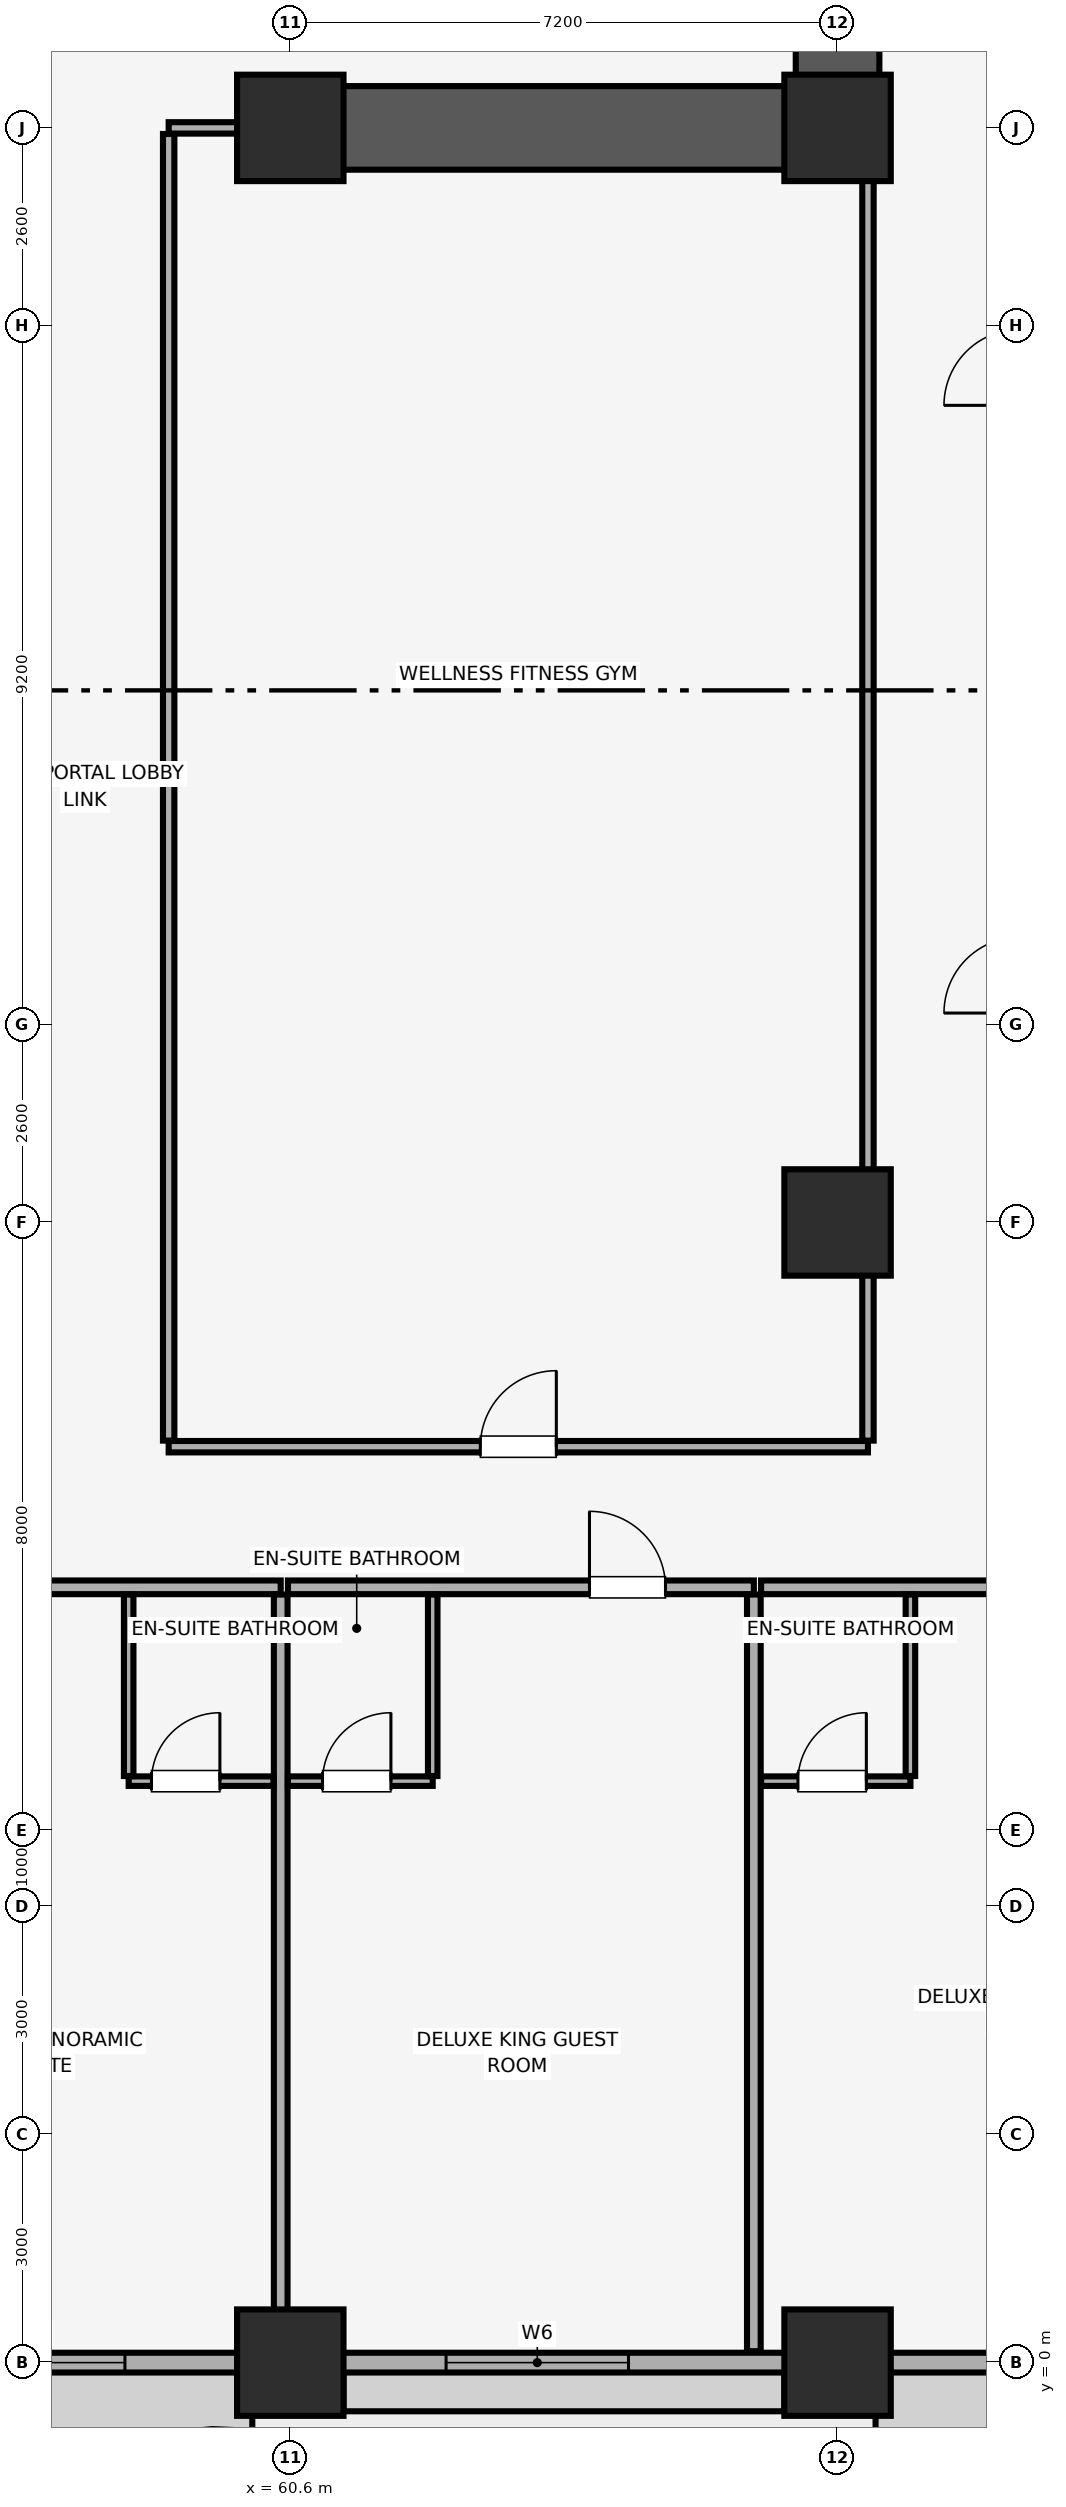
"""IFC4 building model, lengths in metres.
Left out: names, types, materials, properties, quantities, classifications, styles, units other than length and angle.
Written with IfcOpenShell. Run it as: python <this file> out.ifc"""

import sys

from ifc_helpers import new_model, si_unit, direction, frame, frame_2d, origin, origin_2d, place, context, subcontext, project, spatial, rectangle, extrude, element, fill, save


model = new_model("IFC4")
c1 = context("Model", 3, precision=1e-05, world=origin(), true_north=direction((0.0, 1.0)))
c2 = subcontext(c1, "Body", "Model", "MODEL_VIEW")
j1 = project(units=[si_unit("LENGTHUNIT", "METRE"), si_unit("PLANEANGLEUNIT", "RADIAN")], contexts=[c1])
p1 = place(None, origin())
s1 = spatial("IfcSite", under=j1, at=p1, CompositionType="ELEMENT")
p2 = place(p1, origin())
s2 = spatial("IfcBuilding", under=s1, at=p2, CompositionType="ELEMENT")
p3 = place(p2, frame((0.0, 0.0, 46.4)))
s3 = spatial("IfcBuildingStorey", under=s2, at=p3, CompositionType="ELEMENT", Elevation=46.4)
for number, where, z_axis, x_axis in (
    (1, (60.6, 0.0, 0.0), (0.0, 0.0, 1.0), (1.0, 0.0, 0.0)),
    (2, (67.8, 0.0, 0.0), (0.0, 0.0, 1.0), (1.0, 0.0, 0.0)),
    (3, (67.8, 15.0, 0.0), (0.0, 0.0, 1.0), (1.0, 0.0, 0.0)),
    (4, (60.6, 29.4, 0.0), (0.0, 0.0, 1.0), (1.0, 0.0, 0.0)),
    (5, (67.8, 29.4, 0.0), (0.0, 0.0, 1.0), (1.0, 0.0, 0.0)),
):
    element("IfcColumn", number, at=place(p3, frame(where, z_axis=z_axis, x_axis=x_axis)), inside=s3, PredefinedType="COLUMN", context=c2, shape_type="SweptSolid", body=[
        extrude(rectangle(XDim=1.4, YDim=1.4, at=origin_2d()), origin(), (0.0, 0.0, 1.0), 3.51),
    ])
p4 = place(p3, frame((4.2, 0.0, 0.0), z_axis=(0.0, 0.0, 1.0), x_axis=(1.0, 0.0, 0.0)))
e6 = element("IfcWall", 6, at=p4, inside=s3, PredefinedType="SOLIDWALL", context=c2, shape_type="SweptSolid", body=[
    extrude(rectangle(XDim=75.6, YDim=0.26, at=frame_2d((37.8, 0.0))), origin(), (0.0, 0.0, 1.0), 2.56),
])
p5 = place(p4, frame((22.948, 0.0, 0.0)))
e7 = element("IfcOpeningElement", 7, at=p5, cuts=e6, PredefinedType="OPENING", context=c2, shape_type="SweptSolid", body=[
    extrude(rectangle(XDim=1.1, YDim=2.15, at=frame_2d((0.55, 1.075))), frame((0.0, 0.14, 0.0), z_axis=(0.0, -1.0, 0.0), x_axis=(1.0, 0.0, 0.0)), (0.0, 0.0, 1.0), 0.28),
])
p6 = place(p4, frame((44.61, 0.0, 0.0)))
e8 = element("IfcOpeningElement", 8, at=p6, cuts=e6, PredefinedType="OPENING", context=c2, shape_type="SweptSolid", body=[
    extrude(rectangle(XDim=1.1, YDim=2.15, at=frame_2d((0.55, 1.075))), frame((0.0, 0.14, 0.0), z_axis=(0.0, -1.0, 0.0), x_axis=(1.0, 0.0, 0.0)), (0.0, 0.0, 1.0), 0.28),
])
p7 = place(p4, frame((66.272, 0.0, 0.0)))
e9 = element("IfcOpeningElement", 9, at=p7, cuts=e6, PredefinedType="OPENING", context=c2, shape_type="SweptSolid", body=[
    extrude(rectangle(XDim=1.1, YDim=2.15, at=frame_2d((0.55, 1.075))), frame((0.0, 0.14, 0.0), z_axis=(0.0, -1.0, 0.0), x_axis=(1.0, 0.0, 0.0)), (0.0, 0.0, 1.0), 0.28),
])
p8 = place(p4, frame((1.035, 0.0, 0.85)))
e10 = element("IfcOpeningElement", 10, at=p8, cuts=e6, PredefinedType="OPENING", context=c2, shape_type="SweptSolid", body=[
    extrude(rectangle(XDim=2.4, YDim=1.5, at=frame_2d((1.2, 0.75))), frame((0.0, 0.14, 0.0), z_axis=(0.0, -1.0, 0.0), x_axis=(1.0, 0.0, 0.0)), (0.0, 0.0, 1.0), 0.28),
])
p9 = place(p4, frame((7.837, 0.0, 0.85)))
e11 = element("IfcOpeningElement", 11, at=p9, cuts=e6, PredefinedType="OPENING", context=c2, shape_type="SweptSolid", body=[
    extrude(rectangle(XDim=2.4, YDim=1.5, at=frame_2d((1.2, 0.75))), frame((0.0, 0.14, 0.0), z_axis=(0.0, -1.0, 0.0), x_axis=(1.0, 0.0, 0.0)), (0.0, 0.0, 1.0), 0.28),
])
p10 = place(p4, frame((14.55, 0.0, 0.85)))
e12 = element("IfcOpeningElement", 12, at=p10, cuts=e6, PredefinedType="OPENING", context=c2, shape_type="SweptSolid", body=[
    extrude(rectangle(XDim=2.4, YDim=1.5, at=frame_2d((1.2, 0.75))), frame((0.0, 0.14, 0.0), z_axis=(0.0, -1.0, 0.0), x_axis=(1.0, 0.0, 0.0)), (0.0, 0.0, 1.0), 0.28),
])
p11 = place(p4, frame((20.439, 0.0, 0.85)))
e13 = element("IfcOpeningElement", 13, at=p11, cuts=e6, PredefinedType="OPENING", context=c2, shape_type="SweptSolid", body=[
    extrude(rectangle(XDim=1.5, YDim=1.4, at=frame_2d((0.75, 0.7))), frame((0.0, 0.14, 0.0), z_axis=(0.0, -1.0, 0.0), x_axis=(1.0, 0.0, 0.0)), (0.0, 0.0, 1.0), 0.28),
])
p12 = place(p4, frame((27.887, 0.0, 0.85)))
e14 = element("IfcOpeningElement", 14, at=p12, cuts=e6, PredefinedType="OPENING", context=c2, shape_type="SweptSolid", body=[
    extrude(rectangle(XDim=2.4, YDim=1.5, at=frame_2d((1.2, 0.75))), frame((0.0, 0.14, 0.0), z_axis=(0.0, -1.0, 0.0), x_axis=(1.0, 0.0, 0.0)), (0.0, 0.0, 1.0), 0.28),
])
p13 = place(p4, frame((34.6, 0.0, 0.85)))
e15 = element("IfcOpeningElement", 15, at=p13, cuts=e6, PredefinedType="OPENING", context=c2, shape_type="SweptSolid", body=[
    extrude(rectangle(XDim=2.4, YDim=1.5, at=frame_2d((1.2, 0.75))), frame((0.0, 0.14, 0.0), z_axis=(0.0, -1.0, 0.0), x_axis=(1.0, 0.0, 0.0)), (0.0, 0.0, 1.0), 0.28),
])
p14 = place(p4, frame((38.399, 0.0, 0.85)))
e16 = element("IfcOpeningElement", 16, at=p14, cuts=e6, PredefinedType="OPENING", context=c2, shape_type="SweptSolid", body=[
    extrude(rectangle(XDim=2.4, YDim=1.5, at=frame_2d((1.2, 0.75))), frame((0.0, 0.14, 0.0), z_axis=(0.0, -1.0, 0.0), x_axis=(1.0, 0.0, 0.0)), (0.0, 0.0, 1.0), 0.28),
])
p15 = place(p4, frame((46.59, 0.0, 0.85)))
e17 = element("IfcOpeningElement", 17, at=p15, cuts=e6, PredefinedType="OPENING", context=c2, shape_type="SweptSolid", body=[
    extrude(rectangle(XDim=1.5, YDim=1.4, at=frame_2d((0.75, 0.7))), frame((0.0, 0.14, 0.0), z_axis=(0.0, -1.0, 0.0), x_axis=(1.0, 0.0, 0.0)), (0.0, 0.0, 1.0), 0.28),
])
p16 = place(p4, frame((51.824, 0.0, 0.85)))
e18 = element("IfcOpeningElement", 18, at=p16, cuts=e6, PredefinedType="OPENING", context=c2, shape_type="SweptSolid", body=[
    extrude(rectangle(XDim=2.4, YDim=1.5, at=frame_2d((1.2, 0.75))), frame((0.0, 0.14, 0.0), z_axis=(0.0, -1.0, 0.0), x_axis=(1.0, 0.0, 0.0)), (0.0, 0.0, 1.0), 0.28),
])
p17 = place(p4, frame((58.449, 0.0, 0.85)))
e19 = element("IfcOpeningElement", 19, at=p17, cuts=e6, PredefinedType="OPENING", context=c2, shape_type="SweptSolid", body=[
    extrude(rectangle(XDim=2.4, YDim=1.5, at=frame_2d((1.2, 0.75))), frame((0.0, 0.14, 0.0), z_axis=(0.0, -1.0, 0.0), x_axis=(1.0, 0.0, 0.0)), (0.0, 0.0, 1.0), 0.28),
])
p18 = place(p4, frame((72.165, 0.0, 0.85)))
e20 = element("IfcOpeningElement", 20, at=p18, cuts=e6, PredefinedType="OPENING", context=c2, shape_type="SweptSolid", body=[
    extrude(rectangle(XDim=2.4, YDim=1.5, at=frame_2d((1.2, 0.75))), frame((0.0, 0.14, 0.0), z_axis=(0.0, -1.0, 0.0), x_axis=(1.0, 0.0, 0.0)), (0.0, 0.0, 1.0), 0.28),
])
p19 = place(p3, frame((67.8, 29.4, 0.0), z_axis=(0.0, 0.0, 1.0), x_axis=(0.0, 1.0, 0.0)))
e21 = element("IfcWall", 21, at=p19, inside=s3, PredefinedType="SHEAR", context=c2, shape_type="SweptSolid", body=[
    extrude(rectangle(XDim=19.2, YDim=1.1, at=frame_2d((9.6, 0.0))), origin(), (0.0, 0.0, 1.0), 3.51),
])
p20 = place(p3, frame((60.4, 29.4, 0.0), z_axis=(0.0, 0.0, 1.0), x_axis=(1.0, 0.0, 0.0)))
e22 = element("IfcWall", 22, at=p20, inside=s3, PredefinedType="SHEAR", context=c2, shape_type="SweptSolid", body=[
    extrude(rectangle(XDim=6.845, YDim=1.1, at=frame_2d((3.423, 0.0))), origin(), (0.0, 0.0, 1.0), 3.51),
])
p21 = place(p3, frame((54.344, 10.2, 0.0), z_axis=(0.0, 0.0, 1.0), x_axis=(1.0, 0.0, 0.0)))
e23 = element("IfcWall", 23, at=p21, inside=s3, PredefinedType="PARTITIONING", context=c2, shape_type="SweptSolid", body=[
    extrude(rectangle(XDim=6.13, YDim=0.18, at=frame_2d((3.065, 0.0))), origin(), (0.0, 0.0, 1.0), 3.51),
])
p22 = place(p21, frame((1.067, 0.0, 0.0)))
e24 = element("IfcOpeningElement", 24, at=p22, cuts=e23, PredefinedType="OPENING", context=c2, shape_type="SweptSolid", body=[
    extrude(rectangle(XDim=1.0, YDim=2.15, at=frame_2d((0.5, 1.075))), frame((0.0, 0.1, 0.0), z_axis=(0.0, -1.0, 0.0), x_axis=(1.0, 0.0, 0.0)), (0.0, 0.0, 1.0), 0.2),
])
p23 = place(p3, frame((60.474, 0.15, 0.0), z_axis=(0.0, 0.0, 1.0), x_axis=(0.0, 1.0, 0.0)))
e25 = element("IfcWall", 25, at=p23, inside=s3, PredefinedType="PARTITIONING", context=c2, shape_type="SweptSolid", body=[
    extrude(rectangle(XDim=9.955, YDim=0.18, at=frame_2d((4.978, 0.0))), origin(), (0.0, 0.0, 1.0), 2.898),
])
p24 = place(p3, frame((58.474, 7.65, 0.0), z_axis=(0.0, 0.0, 1.0), x_axis=(1.0, 0.0, 0.0)))
e26 = element("IfcWall", 26, at=p24, inside=s3, PredefinedType="PARTITIONING", context=c2, shape_type="SweptSolid", body=[
    extrude(rectangle(XDim=1.905, YDim=0.125, at=frame_2d((0.953, 0.0))), origin(), (0.0, 0.0, 1.0), 3.51),
])
p25 = place(p24, frame((0.3, 0.0, 0.0)))
e27 = element("IfcOpeningElement", 27, at=p25, cuts=e26, PredefinedType="OPENING", context=c2, shape_type="SweptSolid", body=[
    extrude(rectangle(XDim=0.9, YDim=2.1, at=frame_2d((0.45, 1.05))), frame((0.0, 0.073, 0.0), z_axis=(0.0, -1.0, 0.0), x_axis=(1.0, 0.0, 0.0)), (0.0, 0.0, 1.0), 0.145),
])
p26 = place(p3, frame((58.474, 7.718, 0.0), z_axis=(0.0, 0.0, 1.0), x_axis=(0.0, 1.0, 0.0)))
e28 = element("IfcWall", 28, at=p26, inside=s3, PredefinedType="PARTITIONING", context=c2, shape_type="SweptSolid", body=[
    extrude(rectangle(XDim=2.387, YDim=0.125, at=frame_2d((1.194, 0.0))), origin(), (0.0, 0.0, 1.0), 3.51),
])
p27 = place(p3, frame((60.569, 10.2, 0.0), z_axis=(0.0, 0.0, 1.0), x_axis=(1.0, 0.0, 0.0)))
e29 = element("IfcWall", 29, at=p27, inside=s3, PredefinedType="PARTITIONING", context=c2, shape_type="SweptSolid", body=[
    extrude(rectangle(XDim=6.13, YDim=0.18, at=frame_2d((3.065, 0.0))), origin(), (0.0, 0.0, 1.0), 3.51),
])
p28 = place(p27, frame((3.967, 0.0, 0.0)))
e30 = element("IfcOpeningElement", 30, at=p28, cuts=e29, PredefinedType="OPENING", context=c2, shape_type="SweptSolid", body=[
    extrude(rectangle(XDim=1.0, YDim=2.15, at=frame_2d((0.5, 1.075))), frame((0.0, 0.1, 0.0), z_axis=(0.0, -1.0, 0.0), x_axis=(1.0, 0.0, 0.0)), (0.0, 0.0, 1.0), 0.2),
])
p29 = place(p3, frame((66.699, 0.15, 0.0), z_axis=(0.0, 0.0, 1.0), x_axis=(0.0, 1.0, 0.0)))
e31 = element("IfcWall", 31, at=p29, inside=s3, PredefinedType="PARTITIONING", context=c2, shape_type="SweptSolid", body=[
    extrude(rectangle(XDim=9.955, YDim=0.18, at=frame_2d((4.978, 0.0))), origin(), (0.0, 0.0, 1.0), 3.51),
])
p30 = place(p3, frame((60.569, 7.65, 0.0), z_axis=(0.0, 0.0, 1.0), x_axis=(1.0, 0.0, 0.0)))
e32 = element("IfcWall", 32, at=p30, inside=s3, PredefinedType="PARTITIONING", context=c2, shape_type="SweptSolid", body=[
    extrude(rectangle(XDim=1.905, YDim=0.125, at=frame_2d((0.953, 0.0))), origin(), (0.0, 0.0, 1.0), 3.51),
])
p31 = place(p30, frame((0.455, 0.0, 0.0)))
e33 = element("IfcOpeningElement", 33, at=p31, cuts=e32, PredefinedType="OPENING", context=c2, shape_type="SweptSolid", body=[
    extrude(rectangle(XDim=0.9, YDim=2.1, at=frame_2d((0.45, 1.05))), frame((0.0, 0.073, 0.0), z_axis=(0.0, -1.0, 0.0), x_axis=(1.0, 0.0, 0.0)), (0.0, 0.0, 1.0), 0.145),
])
p32 = place(p3, frame((62.474, 7.718, 0.0), z_axis=(0.0, 0.0, 1.0), x_axis=(0.0, 1.0, 0.0)))
e34 = element("IfcWall", 34, at=p32, inside=s3, PredefinedType="PARTITIONING", context=c2, shape_type="SweptSolid", body=[
    extrude(rectangle(XDim=2.387, YDim=0.125, at=frame_2d((1.194, 0.0))), origin(), (0.0, 0.0, 1.0), 3.51),
])
p33 = place(p3, frame((66.794, 10.2, 0.0), z_axis=(0.0, 0.0, 1.0), x_axis=(1.0, 0.0, 0.0)))
e35 = element("IfcWall", 35, at=p33, inside=s3, PredefinedType="PARTITIONING", context=c2, shape_type="SweptSolid", body=[
    extrude(rectangle(XDim=6.331, YDim=0.18, at=frame_2d((3.165, 0.0))), origin(), (0.0, 0.0, 1.0), 3.51),
])
p34 = place(p33, frame((4.098, 0.0, 0.0)))
e36 = element("IfcOpeningElement", 36, at=p34, cuts=e35, PredefinedType="OPENING", context=c2, shape_type="SweptSolid", body=[
    extrude(rectangle(XDim=1.0, YDim=2.15, at=frame_2d((0.5, 1.075))), frame((0.0, 0.1, 0.0), z_axis=(0.0, -1.0, 0.0), x_axis=(1.0, 0.0, 0.0)), (0.0, 0.0, 1.0), 0.2),
])
p35 = place(p3, frame((66.794, 7.65, 0.0), z_axis=(0.0, 0.0, 1.0), x_axis=(1.0, 0.0, 0.0)))
e37 = element("IfcWall", 37, at=p35, inside=s3, PredefinedType="PARTITIONING", context=c2, shape_type="SweptSolid", body=[
    extrude(rectangle(XDim=1.965, YDim=0.125, at=frame_2d((0.982, 0.0))), origin(), (0.0, 0.0, 1.0), 3.51),
])
p36 = place(p35, frame((0.485, 0.0, 0.0)))
e38 = element("IfcOpeningElement", 38, at=p36, cuts=e37, PredefinedType="OPENING", context=c2, shape_type="SweptSolid", body=[
    extrude(rectangle(XDim=0.9, YDim=2.1, at=frame_2d((0.45, 1.05))), frame((0.0, 0.073, 0.0), z_axis=(0.0, -1.0, 0.0), x_axis=(1.0, 0.0, 0.0)), (0.0, 0.0, 1.0), 0.145),
])
p37 = place(p3, frame((68.759, 7.718, 0.0), z_axis=(0.0, 0.0, 1.0), x_axis=(0.0, 1.0, 0.0)))
e39 = element("IfcWall", 39, at=p37, inside=s3, PredefinedType="PARTITIONING", context=c2, shape_type="SweptSolid", body=[
    extrude(rectangle(XDim=2.387, YDim=0.125, at=frame_2d((1.194, 0.0))), origin(), (0.0, 0.0, 1.0), 3.51),
])
p38 = place(p3, frame((59.0, 12.05, 0.0), z_axis=(0.0, 0.0, 1.0), x_axis=(1.0, 0.0, 0.0)))
e40 = element("IfcWall", 40, at=p38, inside=s3, PredefinedType="PARTITIONING", context=c2, shape_type="SweptSolid", body=[
    extrude(rectangle(XDim=9.2, YDim=0.15, at=frame_2d((4.6, 0.0))), origin(), (0.0, 0.0, 1.0), 3.51),
])
p39 = place(p38, frame((4.1, 0.0, 0.0)))
e41 = element("IfcOpeningElement", 41, at=p39, cuts=e40, PredefinedType="OPENING", context=c2, shape_type="SweptSolid", body=[
    extrude(rectangle(XDim=1.0, YDim=2.15, at=frame_2d((0.5, 1.075))), frame((0.0, 0.085, 0.0), z_axis=(0.0, -1.0, 0.0), x_axis=(1.0, 0.0, 0.0)), (0.0, 0.0, 1.0), 0.17),
])
p40 = place(p3, frame((59.0, 29.4, 0.0), z_axis=(0.0, 0.0, 1.0), x_axis=(1.0, 0.0, 0.0)))
e42 = element("IfcWall", 42, at=p40, inside=s3, PredefinedType="PARTITIONING", context=c2, shape_type="SweptSolid", body=[
    extrude(rectangle(XDim=1.39, YDim=0.15, at=frame_2d((0.695, 0.0))), origin(), (0.0, 0.0, 1.0), 2.41),
])
p41 = place(p3, frame((59.0, 12.13, 0.0), z_axis=(0.0, 0.0, 1.0), x_axis=(0.0, 1.0, 0.0)))
e43 = element("IfcWall", 43, at=p41, inside=s3, PredefinedType="PARTITIONING", context=c2, shape_type="SweptSolid", body=[
    extrude(rectangle(XDim=17.19, YDim=0.15, at=frame_2d((8.595, 0.0))), origin(), (0.0, 0.0, 1.0), 3.51),
])
p42 = place(p3, frame((68.2, 12.13, 0.0), z_axis=(0.0, 0.0, 1.0), x_axis=(0.0, 1.0, 0.0)))
e44 = element("IfcWall", 44, at=p42, inside=s3, PredefinedType="PARTITIONING", context=c2, shape_type="SweptSolid", body=[
    extrude(rectangle(XDim=17.26, YDim=0.15, at=frame_2d((8.63, 0.0))), origin(), (0.0, 0.0, 1.0), 3.51),
])
p43 = place(p16, origin())
e45 = element("IfcWindow", 45, at=p43, inside=s3, PartitioningType="SINGLE_PANEL", PredefinedType="WINDOW", context=c2, shape_type="SweptSolid", body=[
    extrude(rectangle(XDim=2.4, YDim=1.5, at=frame_2d((1.2, 0.75))), frame((0.0, 0.03, 0.0), z_axis=(0.0, -1.0, 0.0), x_axis=(1.0, 0.0, 0.0)), (0.0, 0.0, 1.0), 0.06),
])
fill(e18, e45)
p44 = place(p17, origin())
e46 = element("IfcWindow", 46, at=p44, inside=s3, PartitioningType="SINGLE_PANEL", PredefinedType="WINDOW", context=c2, shape_type="SweptSolid", body=[
    extrude(rectangle(XDim=2.4, YDim=1.5, at=frame_2d((1.2, 0.75))), frame((0.0, 0.03, 0.0), z_axis=(0.0, -1.0, 0.0), x_axis=(1.0, 0.0, 0.0)), (0.0, 0.0, 1.0), 0.06),
])
fill(e19, e46)
p45 = place(p25, origin())
e47 = element("IfcDoor", 47, at=p45, inside=s3, OperationType="SINGLE_SWING_RIGHT", PredefinedType="DOOR", context=c2, shape_type="SweptSolid", body=[
    extrude(rectangle(XDim=0.9, YDim=2.1, at=frame_2d((0.45, 1.05))), frame((0.0, 0.025, 0.0), z_axis=(0.0, -1.0, 0.0), x_axis=(1.0, 0.0, 0.0)), (0.0, 0.0, 1.0), 0.05),
])
fill(e27, e47)
p46 = place(p28, origin())
e48 = element("IfcDoor", 48, at=p46, inside=s3, OperationType="SINGLE_SWING_LEFT", PredefinedType="DOOR", context=c2, shape_type="SweptSolid", body=[
    extrude(rectangle(XDim=1.0, YDim=2.15, at=frame_2d((0.5, 1.075))), frame((0.0, 0.025, 0.0), z_axis=(0.0, -1.0, 0.0), x_axis=(1.0, 0.0, 0.0)), (0.0, 0.0, 1.0), 0.05),
])
fill(e30, e48)
p47 = place(p31, origin())
e49 = element("IfcDoor", 49, at=p47, inside=s3, OperationType="SINGLE_SWING_RIGHT", PredefinedType="DOOR", context=c2, shape_type="SweptSolid", body=[
    extrude(rectangle(XDim=0.9, YDim=2.1, at=frame_2d((0.45, 1.05))), frame((0.0, 0.025, 0.0), z_axis=(0.0, -1.0, 0.0), x_axis=(1.0, 0.0, 0.0)), (0.0, 0.0, 1.0), 0.05),
])
fill(e33, e49)
p48 = place(p36, origin())
e50 = element("IfcDoor", 50, at=p48, inside=s3, OperationType="SINGLE_SWING_RIGHT", PredefinedType="DOOR", context=c2, shape_type="SweptSolid", body=[
    extrude(rectangle(XDim=0.9, YDim=2.1, at=frame_2d((0.45, 1.05))), frame((0.0, 0.025, 0.0), z_axis=(0.0, -1.0, 0.0), x_axis=(1.0, 0.0, 0.0)), (0.0, 0.0, 1.0), 0.05),
])
fill(e38, e50)
p49 = place(p39, origin())
e51 = element("IfcDoor", 51, at=p49, inside=s3, OperationType="SINGLE_SWING_RIGHT", PredefinedType="DOOR", context=c2, shape_type="SweptSolid", body=[
    extrude(rectangle(XDim=1.0, YDim=2.15, at=frame_2d((0.5, 1.075))), frame((0.0, 0.025, 0.0), z_axis=(0.0, -1.0, 0.0), x_axis=(1.0, 0.0, 0.0)), (0.0, 0.0, 1.0), 0.05),
])
fill(e41, e51)
save(model, sys.argv[1])
